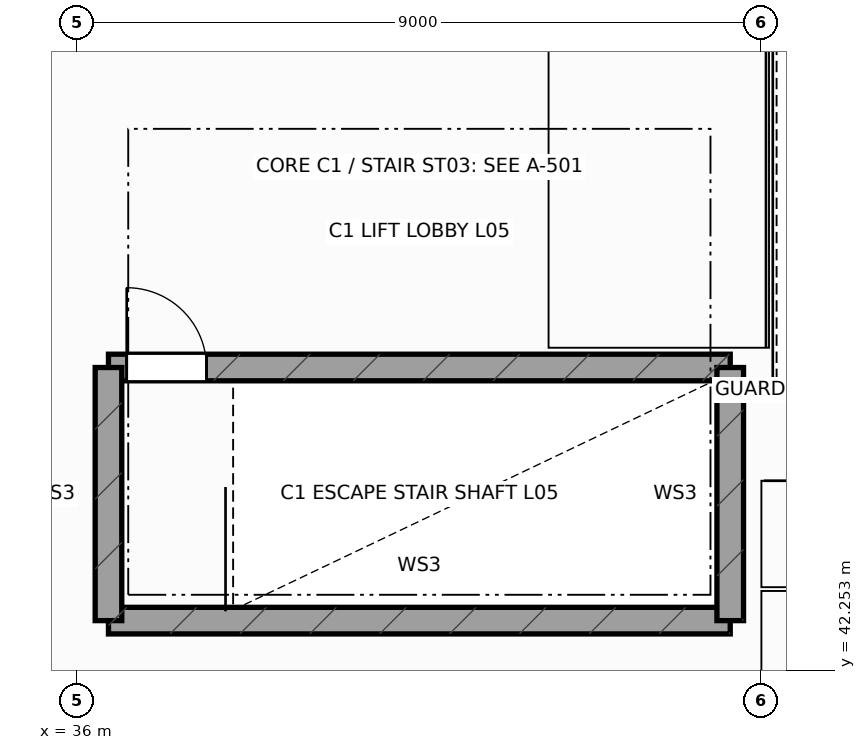
"""IFC4 building model, lengths in metres.
Left out: names, types, materials, properties, quantities, classifications, styles, units other than length and angle.
Written with IfcOpenShell. Run it as: python <this file> out.ifc"""

import sys

from ifc_helpers import new_model, si_unit, direction, frame, frame_2d, origin, place, context, subcontext, project, spatial, rectangle, extrude, element, fill, save


model = new_model("IFC4")
c1 = context("Model", 3, precision=1e-05, world=origin(), true_north=direction((0.0, 1.0)))
c2 = subcontext(c1, "Body", "Model", "MODEL_VIEW")
j1 = project(units=[si_unit("LENGTHUNIT", "METRE"), si_unit("PLANEANGLEUNIT", "RADIAN")], contexts=[c1])
p1 = place(None, origin())
s1 = spatial("IfcSite", under=j1, at=p1, CompositionType="ELEMENT")
p2 = place(p1, origin())
s2 = spatial("IfcBuilding", under=s1, at=p2, CompositionType="ELEMENT")
p3 = place(p2, frame((0.0, 0.0, 26.4)))
s3 = spatial("IfcBuildingStorey", under=s2, at=p3, CompositionType="ELEMENT", Elevation=26.4)
p4 = place(p3, frame((36.41, 42.91, 0.0), z_axis=(0.0, 0.0, 1.0), x_axis=(1.0, 0.0, 0.0)))
e1 = element("IfcWall", 1, at=p4, inside=s3, PredefinedType="SHEAR", context=c2, shape_type="SweptSolid", body=[
    extrude(rectangle(XDim=8.18, YDim=0.35, at=frame_2d((4.09, 0.0))), origin(), (0.0, 0.0, 1.0), 3.94),
])
p5 = place(p3, frame((36.41, 46.24, 0.0), z_axis=(0.0, 0.0, 1.0), x_axis=(1.0, 0.0, 0.0)))
e2 = element("IfcWall", 2, at=p5, inside=s3, PredefinedType="SHEAR", context=c2, shape_type="SweptSolid", body=[
    extrude(rectangle(XDim=8.18, YDim=0.35, at=frame_2d((4.09, 0.0))), origin(), (0.0, 0.0, 1.0), 3.94),
])
p6 = place(p5, frame((0.24, 0.0, 0.0)))
e3 = element("IfcOpeningElement", 3, at=p6, cuts=e2, PredefinedType="OPENING", context=c2, shape_type="SweptSolid", body=[
    extrude(rectangle(XDim=1.05, YDim=2.18, at=frame_2d((0.525, 1.09))), frame((0.0, 0.185, 0.0), z_axis=(0.0, -1.0, 0.0), x_axis=(1.0, 0.0, 0.0)), (0.0, 0.0, 1.0), 0.37),
])
for number, where, z_axis, x_axis in (
    (4, (36.41, 42.91, 0.0), (0.0, 0.0, 1.0), (0.0, 1.0, 0.0)),
    (5, (44.59, 42.91, 0.0), (0.0, 0.0, 1.0), (0.0, 1.0, 0.0)),
):
    element("IfcWall", number, at=place(p3, frame(where, z_axis=z_axis, x_axis=x_axis)), inside=s3, PredefinedType="SHEAR", context=c2, shape_type="SweptSolid", body=[
        extrude(rectangle(XDim=3.33, YDim=0.35, at=frame_2d((1.665, 0.0))), origin(), (0.0, 0.0, 1.0), 3.94),
    ])
p7 = place(p6, origin())
e6 = element("IfcDoor", 6, at=p7, inside=s3, OperationType="SINGLE_SWING_LEFT", PredefinedType="DOOR", context=c2, shape_type="SweptSolid", body=[
    extrude(rectangle(XDim=1.05, YDim=2.18, at=frame_2d((0.525, 1.09))), frame((0.0, 0.025, 0.0), z_axis=(0.0, -1.0, 0.0), x_axis=(1.0, 0.0, 0.0)), (0.0, 0.0, 1.0), 0.05),
])
fill(e3, e6)
save(model, sys.argv[1])
